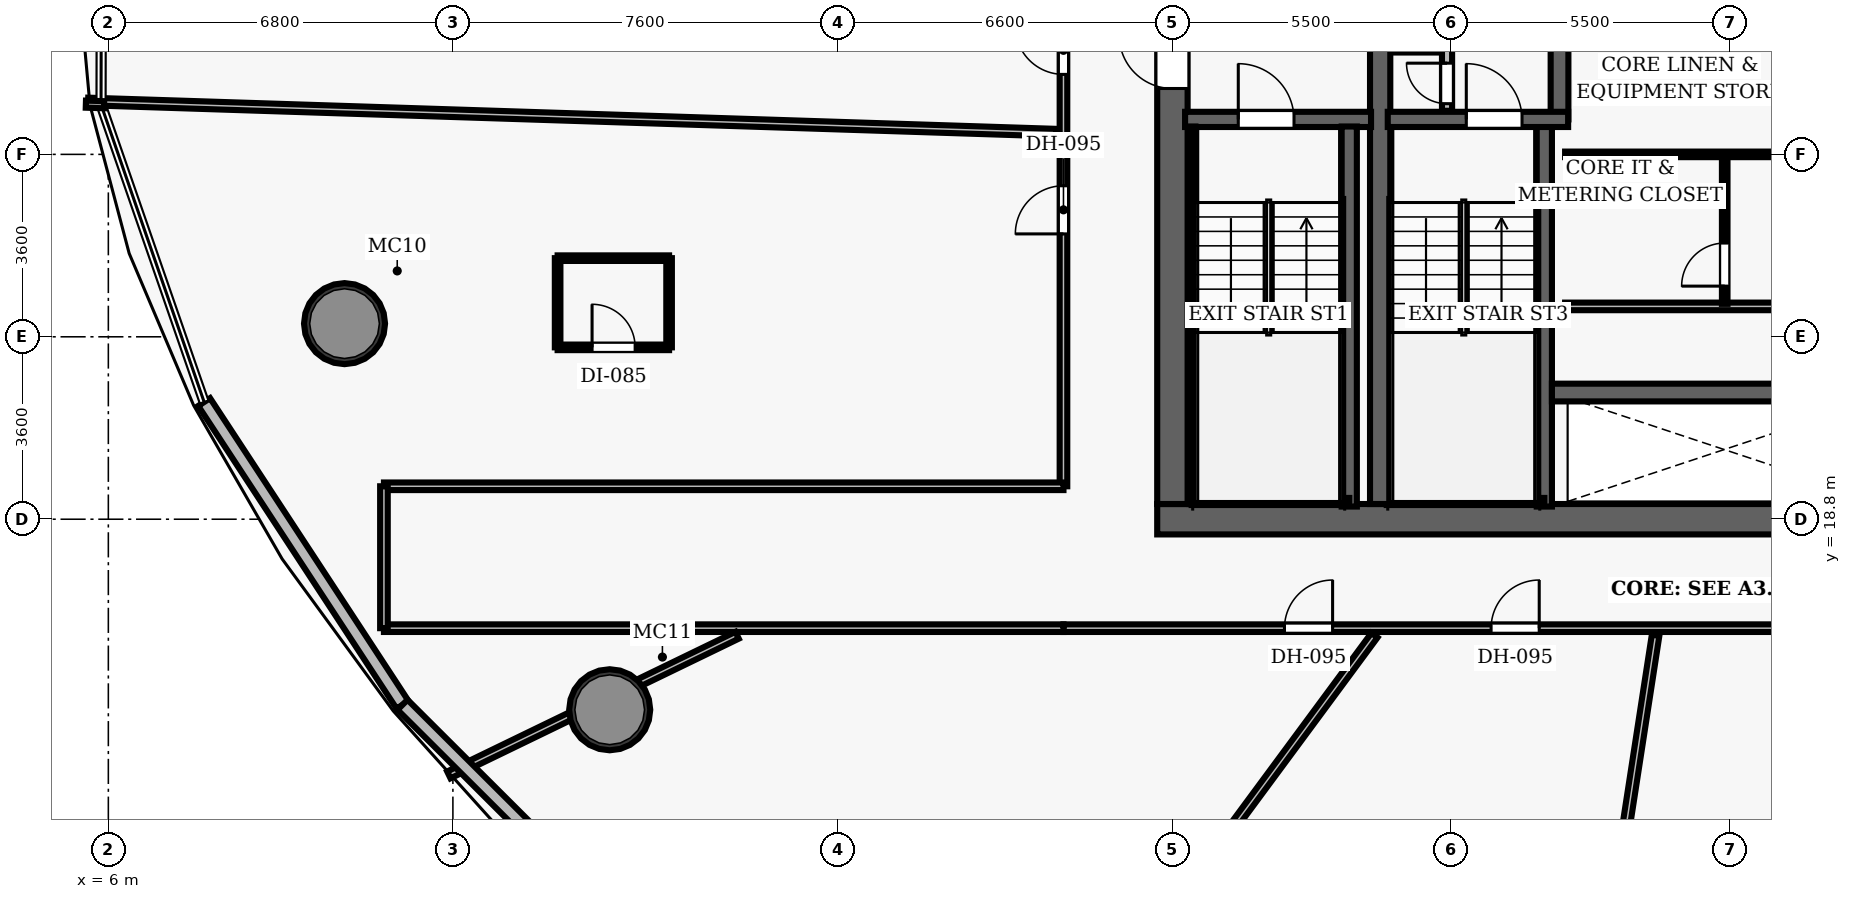
"""IFC4 building model, lengths in metres.
Left out: names, types, materials, properties, quantities, classifications, styles, units other than length and angle.
Written with IfcOpenShell. Run it as: python <this file> out.ifc"""

import sys

from ifc_helpers import new_model, si_unit, direction, frame, frame_2d, origin, origin_2d, place, context, subcontext, project, spatial, rectangle, hollow_circle, extrude, element, fill, save


model = new_model("IFC4")
c1 = context("Model", 3, precision=1e-05, world=origin(), true_north=direction((0.0, 1.0)))
c2 = subcontext(c1, "Body", "Model", "MODEL_VIEW")
j1 = project(units=[si_unit("LENGTHUNIT", "METRE"), si_unit("PLANEANGLEUNIT", "RADIAN")], contexts=[c1])
p1 = place(None, origin())
s1 = spatial("IfcSite", under=j1, at=p1, CompositionType="ELEMENT")
p2 = place(p1, origin())
s2 = spatial("IfcBuilding", under=s1, at=p2, CompositionType="ELEMENT")
p3 = place(p2, frame((0.0, 0.0, 79.9)))
s3 = spatial("IfcBuildingStorey", under=s2, at=p3, CompositionType="ELEMENT", Elevation=79.9)
p4 = place(p3, frame((26.7, 18.8, 0.0), z_axis=(0.0, 0.0, 1.0), x_axis=(1.0, 0.0, 0.0)))
e1 = element("IfcWall", 1, at=p4, inside=s3, PredefinedType="SHEAR", context=c2, shape_type="SweptSolid", body=[
    extrude(rectangle(XDim=22.6, YDim=0.6, at=frame_2d((11.3, 0.0))), origin(), (0.0, 0.0, 1.0), 3.5),
])
p5 = place(p4, frame((14.52, 0.0, 0.0)))
e2 = element("IfcOpeningElement", 2, at=p5, cuts=e1, PredefinedType="OPENING", context=c2, shape_type="SweptSolid", body=[
    extrude(rectangle(XDim=1.05, YDim=2.15, at=frame_2d((0.525, 1.075))), frame((0.0, 0.31, 0.0), z_axis=(0.0, -1.0, 0.0), x_axis=(1.0, 0.0, 0.0)), (0.0, 0.0, 1.0), 0.62),
])
p6 = place(p3, frame((27.0, 19.1, 0.0), z_axis=(0.0, 0.0, 1.0), x_axis=(0.0, 1.0, 0.0)))
e3 = element("IfcWall", 3, at=p6, inside=s3, PredefinedType="SHEAR", context=c2, shape_type="SweptSolid", body=[
    extrude(rectangle(XDim=13.8, YDim=0.6, at=frame_2d((6.9, 0.0))), origin(), (0.0, 0.0, 1.0), 3.5),
])
p7 = place(p6, frame((8.2, 0.0, 0.0)))
e4 = element("IfcOpeningElement", 4, at=p7, cuts=e3, PredefinedType="OPENING", context=c2, shape_type="SweptSolid", body=[
    extrude(rectangle(XDim=1.05, YDim=2.15, at=frame_2d((0.525, 1.075))), frame((0.0, 0.31, 0.0), z_axis=(0.0, -1.0, 0.0), x_axis=(1.0, 0.0, 0.0)), (0.0, 0.0, 1.0), 0.62),
])
p8 = place(p3, frame((31.1, 19.1, 0.0), z_axis=(0.0, 0.0, 1.0), x_axis=(0.0, 1.0, 0.0)))
e5 = element("IfcWall", 5, at=p8, inside=s3, PredefinedType="SHEAR", context=c2, shape_type="SweptSolid", body=[
    extrude(rectangle(XDim=13.8, YDim=0.4, at=frame_2d((6.9, 0.0))), origin(), (0.0, 0.0, 1.0), 3.5),
])
for number, where, z_axis, x_axis in (
    (6, (10.661, 22.66, 0.0), (0.0, 0.0, 1.0), (1.0, 0.0, 0.0)),
    (7, (15.895, 15.04, 0.0), (0.0, 0.0, 1.0), (1.0, 0.0, 0.0)),
):
    element("IfcColumn", number, at=place(p3, frame(where, z_axis=z_axis, x_axis=x_axis)), inside=s3, PredefinedType="COLUMN", context=c2, shape_type="SweptSolid", body=[
        extrude(hollow_circle(Radius=0.8, WallThickness=0.06, at=origin_2d()), origin(), (0.0, 0.0, 1.0), 3.5),
    ])
p9 = place(p3, frame((27.25, 26.69, 0.0), z_axis=(0.0, 0.0, 1.0), x_axis=(1.0, 0.0, 0.0)))
e8 = element("IfcWall", 8, at=p9, inside=s3, PredefinedType="SHEAR", context=c2, shape_type="SweptSolid", body=[
    extrude(rectangle(XDim=3.67, YDim=0.3, at=frame_2d((1.835, 0.0))), origin(), (0.0, 0.0, 1.0), 3.5),
])
p10 = place(p9, frame((1.05, 0.0, 0.0)))
e9 = element("IfcOpeningElement", 9, at=p10, cuts=e8, PredefinedType="OPENING", context=c2, shape_type="SweptSolid", body=[
    extrude(rectangle(XDim=1.1, YDim=2.15, at=frame_2d((0.55, 1.075))), frame((0.0, 0.16, 0.0), z_axis=(0.0, -1.0, 0.0), x_axis=(1.0, 0.0, 0.0)), (0.0, 0.0, 1.0), 0.32),
])
p11 = place(p3, frame((30.49, 19.05, 0.0), z_axis=(0.0, 0.0, 1.0), x_axis=(0.0, 1.0, 0.0)))
e10 = element("IfcWall", 10, at=p11, inside=s3, PredefinedType="SHEAR", context=c2, shape_type="SweptSolid", body=[
    extrude(rectangle(XDim=7.5, YDim=0.3, at=frame_2d((3.75, 0.0))), origin(), (0.0, 0.0, 1.0), 3.5),
])
p12 = place(p3, frame((27.395, 19.1, 0.0), z_axis=(0.0, 0.0, 1.0), x_axis=(0.0, 1.0, 0.0)))
e11 = element("IfcWall", 11, at=p12, inside=s3, PredefinedType="SHEAR", context=c2, shape_type="SweptSolid", body=[
    extrude(rectangle(XDim=7.45, YDim=0.12, at=frame_2d((3.725, 0.0))), origin(), (0.0, 0.0, 1.0), 3.5),
])
p13 = place(p3, frame((27.395, 19.16, 0.0), z_axis=(0.0, 0.0, 1.0), x_axis=(1.0, 0.0, 0.0)))
e12 = element("IfcWall", 12, at=p13, inside=s3, PredefinedType="SHEAR", context=c2, shape_type="SweptSolid", body=[
    extrude(rectangle(XDim=3.095, YDim=0.12, at=frame_2d((1.547, 0.0))), origin(), (0.0, 0.0, 1.0), 3.5),
])
p14 = place(p3, frame((34.34, 19.05, 0.0), z_axis=(0.0, 0.0, 1.0), x_axis=(0.0, 1.0, 0.0)))
e13 = element("IfcWall", 13, at=p14, inside=s3, PredefinedType="SHEAR", context=c2, shape_type="SweptSolid", body=[
    extrude(rectangle(XDim=7.5, YDim=0.3, at=frame_2d((3.75, 0.0))), origin(), (0.0, 0.0, 1.0), 3.5),
])
p15 = place(p3, frame((34.64, 26.69, 0.0), z_axis=(0.0, 0.0, 1.0), x_axis=(0.0, 1.0, 0.0)))
e14 = element("IfcWall", 14, at=p15, inside=s3, PredefinedType="SHEAR", context=c2, shape_type="SweptSolid", body=[
    extrude(rectangle(XDim=6.26, YDim=0.35, at=frame_2d((3.13, 0.0))), origin(), (0.0, 0.0, 1.0), 3.5),
])
p16 = place(p3, frame((31.25, 26.69, 0.0), z_axis=(0.0, 0.0, 1.0), x_axis=(1.0, 0.0, 0.0)))
e15 = element("IfcWall", 15, at=p16, inside=s3, PredefinedType="SHEAR", context=c2, shape_type="SweptSolid", body=[
    extrude(rectangle(XDim=3.56, YDim=0.3, at=frame_2d((1.78, 0.0))), origin(), (0.0, 0.0, 1.0), 3.5),
])
p17 = place(p16, frame((1.55, 0.0, 0.0)))
e16 = element("IfcOpeningElement", 16, at=p17, cuts=e15, PredefinedType="OPENING", context=c2, shape_type="SweptSolid", body=[
    extrude(rectangle(XDim=1.1, YDim=2.15, at=frame_2d((0.55, 1.075))), frame((0.0, 0.16, 0.0), z_axis=(0.0, -1.0, 0.0), x_axis=(1.0, 0.0, 0.0)), (0.0, 0.0, 1.0), 0.32),
])
p18 = place(p3, frame((31.3, 19.16, 0.0), z_axis=(0.0, 0.0, 1.0), x_axis=(1.0, 0.0, 0.0)))
e17 = element("IfcWall", 17, at=p18, inside=s3, PredefinedType="SHEAR", context=c2, shape_type="SweptSolid", body=[
    extrude(rectangle(XDim=3.04, YDim=0.12, at=frame_2d((1.52, 0.0))), origin(), (0.0, 0.0, 1.0), 3.5),
])
p19 = place(p3, frame((32.42, 26.86, 0.0), z_axis=(0.0, 0.0, 1.0), x_axis=(0.0, 1.0, 0.0)))
e18 = element("IfcWall", 18, at=p19, inside=s3, PredefinedType="PARTITIONING", context=c2, shape_type="SweptSolid", body=[
    extrude(rectangle(XDim=2.04, YDim=0.2, at=frame_2d((1.02, 0.0))), origin(), (0.0, 0.0, 1.0), 2.6),
])
p20 = place(p19, frame((0.14, 0.0, 0.0)))
e19 = element("IfcOpeningElement", 19, at=p20, cuts=e18, PredefinedType="OPENING", context=c2, shape_type="SweptSolid", body=[
    extrude(rectangle(XDim=0.8, YDim=2.05, at=frame_2d((0.4, 1.025))), frame((0.0, 0.11, 0.0), z_axis=(0.0, -1.0, 0.0), x_axis=(1.0, 0.0, 0.0)), (0.0, 0.0, 1.0), 0.22),
])
p21 = place(p3, frame((34.49, 21.3, 0.0), z_axis=(0.0, 0.0, 1.0), x_axis=(1.0, 0.0, 0.0)))
e20 = element("IfcWall", 20, at=p21, inside=s3, PredefinedType="SHEAR", context=c2, shape_type="SweptSolid", body=[
    extrude(rectangle(XDim=6.68, YDim=0.35, at=frame_2d((3.34, 0.0))), origin(), (0.0, 0.0, 1.0), 2.6),
])
p22 = place(p3, frame((34.75, 23.0, 0.0), z_axis=(0.0, 0.0, 1.0), x_axis=(1.0, 0.0, 0.0)))
e21 = element("IfcWall", 21, at=p22, inside=s3, PredefinedType="PARTITIONING", context=c2, shape_type="SweptSolid", body=[
    extrude(rectangle(XDim=6.25, YDim=0.15, at=frame_2d((3.125, 0.0))), origin(), (0.0, 0.0, 1.0), 2.6),
])
p23 = place(p3, frame((34.75, 26.0, 0.0), z_axis=(0.0, 0.0, 1.0), x_axis=(1.0, 0.0, 0.0)))
e22 = element("IfcWall", 22, at=p23, inside=s3, PredefinedType="PARTITIONING", context=c2, shape_type="SweptSolid", body=[
    extrude(rectangle(XDim=6.25, YDim=0.11, at=frame_2d((3.125, 0.0))), origin(), (0.0, 0.0, 1.0), 2.6),
])
p24 = place(p3, frame((37.9, 23.05, 0.0), z_axis=(0.0, 0.0, 1.0), x_axis=(0.0, 1.0, 0.0)))
e23 = element("IfcWall", 23, at=p24, inside=s3, PredefinedType="PARTITIONING", context=c2, shape_type="SweptSolid", body=[
    extrude(rectangle(XDim=2.95, YDim=0.11, at=frame_2d((1.475, 0.0))), origin(), (0.0, 0.0, 1.0), 2.6),
])
p25 = place(p24, frame((0.35, 0.0, 0.0)))
e24 = element("IfcOpeningElement", 24, at=p25, cuts=e23, PredefinedType="OPENING", context=c2, shape_type="SweptSolid", body=[
    extrude(rectangle(XDim=0.85, YDim=2.1, at=frame_2d((0.425, 1.05))), frame((0.0, 0.065, 0.0), z_axis=(0.0, -1.0, 0.0), x_axis=(1.0, 0.0, 0.0)), (0.0, 0.0, 1.0), 0.13),
])
p26 = place(p3, frame((24.85, 16.65, 0.0), z_axis=(0.0, 0.0, 1.0), x_axis=(1.0, 0.0, 0.0)))
e25 = element("IfcWall", 25, at=p26, inside=s3, PredefinedType="PARTITIONING", context=c2, shape_type="SweptSolid", body=[
    extrude(rectangle(XDim=23.5, YDim=0.15, at=frame_2d((11.75, 0.0))), origin(), (0.0, 0.0, 1.0), 2.6),
])
p27 = place(p26, frame((4.362, 0.0, 0.0)))
e26 = element("IfcOpeningElement", 26, at=p27, cuts=e25, PredefinedType="OPENING", context=c2, shape_type="SweptSolid", body=[
    extrude(rectangle(XDim=0.95, YDim=2.15, at=frame_2d((0.475, 1.075))), frame((0.0, 0.085, 0.0), z_axis=(0.0, -1.0, 0.0), x_axis=(1.0, 0.0, 0.0)), (0.0, 0.0, 1.0), 0.17),
])
p28 = place(p26, frame((8.439, 0.0, 0.0)))
e27 = element("IfcOpeningElement", 27, at=p28, cuts=e25, PredefinedType="OPENING", context=c2, shape_type="SweptSolid", body=[
    extrude(rectangle(XDim=0.95, YDim=2.15, at=frame_2d((0.475, 1.075))), frame((0.0, 0.085, 0.0), z_axis=(0.0, -1.0, 0.0), x_axis=(1.0, 0.0, 0.0)), (0.0, 0.0, 1.0), 0.17),
])
p29 = place(p26, frame((14.893, 0.0, 0.0)))
e28 = element("IfcOpeningElement", 28, at=p29, cuts=e25, PredefinedType="OPENING", context=c2, shape_type="SweptSolid", body=[
    extrude(rectangle(XDim=0.95, YDim=2.15, at=frame_2d((0.475, 1.075))), frame((0.0, 0.085, 0.0), z_axis=(0.0, -1.0, 0.0), x_axis=(1.0, 0.0, 0.0)), (0.0, 0.0, 1.0), 0.17),
])
p30 = place(p26, frame((17.475, 0.0, 0.0)))
e29 = element("IfcOpeningElement", 29, at=p30, cuts=e25, PredefinedType="OPENING", context=c2, shape_type="SweptSolid", body=[
    extrude(rectangle(XDim=0.95, YDim=2.15, at=frame_2d((0.475, 1.075))), frame((0.0, 0.085, 0.0), z_axis=(0.0, -1.0, 0.0), x_axis=(1.0, 0.0, 0.0)), (0.0, 0.0, 1.0), 0.17),
])
p31 = place(p3, frame((24.85, 19.45, 0.0), z_axis=(0.0, 0.0, 1.0), x_axis=(0.0, 1.0, 0.0)))
e30 = element("IfcWall", 30, at=p31, inside=s3, PredefinedType="PARTITIONING", context=c2, shape_type="SweptSolid", body=[
    extrude(rectangle(XDim=15.9, YDim=0.15, at=frame_2d((7.95, 0.0))), origin(), (0.0, 0.0, 1.0), 2.6),
])
p32 = place(p31, frame((8.128, 0.0, 0.0)))
e31 = element("IfcOpeningElement", 31, at=p32, cuts=e30, PredefinedType="OPENING", context=c2, shape_type="SweptSolid", body=[
    extrude(rectangle(XDim=0.95, YDim=2.15, at=frame_2d((0.475, 1.075))), frame((0.0, 0.085, 0.0), z_axis=(0.0, -1.0, 0.0), x_axis=(1.0, 0.0, 0.0)), (0.0, 0.0, 1.0), 0.17),
])
p33 = place(p31, frame((4.98, 0.0, 0.0)))
e32 = element("IfcOpeningElement", 32, at=p33, cuts=e30, PredefinedType="OPENING", context=c2, shape_type="SweptSolid", body=[
    extrude(rectangle(XDim=0.95, YDim=2.15, at=frame_2d((0.475, 1.075))), frame((0.0, 0.085, 0.0), z_axis=(0.0, -1.0, 0.0), x_axis=(1.0, 0.0, 0.0)), (0.0, 0.0, 1.0), 0.17),
])
for number, where, z_axis, x_axis in (
    (33, (11.439, 19.45, 0.0), (0.0, 0.0, 1.0), (1.0, 0.0, 0.0)),
    (34, (11.439, 16.65, 0.0), (0.0, 0.0, 1.0), (1.0, 0.0, 0.0)),
):
    element("IfcWall", number, at=place(p3, frame(where, z_axis=z_axis, x_axis=x_axis)), inside=s3, PredefinedType="PARTITIONING", context=c2, shape_type="SweptSolid", body=[
        extrude(rectangle(XDim=13.411, YDim=0.15, at=frame_2d((6.706, 0.0))), origin(), (0.0, 0.0, 1.0), 2.6),
    ])
p34 = place(p3, frame((11.439, 16.65, 0.0), z_axis=(0.0, 0.0, 1.0), x_axis=(0.0, 1.0, 0.0)))
e35 = element("IfcWall", 35, at=p34, inside=s3, PredefinedType="PARTITIONING", context=c2, shape_type="SweptSolid", body=[
    extrude(rectangle(XDim=2.8, YDim=0.15, at=frame_2d((1.4, 0.0))), origin(), (0.0, 0.0, 1.0), 2.6),
])
p35 = place(p3, frame((24.71, 26.428, 0.0), z_axis=(0.0, 0.0, 1.0), x_axis=(-0.99948130829, 0.032204260266, 0.0)))
e36 = element("IfcWall", 36, at=p35, inside=s3, PredefinedType="PARTITIONING", context=c2, shape_type="SweptSolid", body=[
    extrude(rectangle(XDim=19.119, YDim=0.15, at=frame_2d((9.56, 0.0))), origin(), (0.0, 0.0, 1.0), 2.6),
])
p36 = place(p3, frame((18.409, 16.51, 0.0), z_axis=(0.0, 0.0, 1.0), x_axis=(-0.899956937803, -0.435978795471, 0.0)))
e37 = element("IfcWall", 37, at=p36, inside=s3, PredefinedType="PARTITIONING", context=c2, shape_type="SweptSolid", body=[
    extrude(rectangle(XDim=6.322, YDim=0.15, at=frame_2d((3.161, 0.0))), origin(), (0.0, 0.0, 1.0), 2.6),
])
p37 = place(p3, frame((30.988, 16.51, 0.0), z_axis=(0.0, 0.0, 1.0), x_axis=(-0.594283048569, -0.804255965587, 0.0)))
e38 = element("IfcWall", 38, at=p37, inside=s3, PredefinedType="PARTITIONING", context=c2, shape_type="SweptSolid", body=[
    extrude(rectangle(XDim=13.538, YDim=0.15, at=frame_2d((6.769, 0.0))), origin(), (0.0, 0.0, 1.0), 2.6),
])
p38 = place(p3, frame((36.536, 16.51, 0.0), z_axis=(0.0, 0.0, 1.0), x_axis=(-0.152461170768, -0.988309461357, 0.0)))
e39 = element("IfcWall", 39, at=p38, inside=s3, PredefinedType="PARTITIONING", context=c2, shape_type="SweptSolid", body=[
    extrude(rectangle(XDim=14.713, YDim=0.15, at=frame_2d((7.356, 0.0))), origin(), (0.0, 0.0, 1.0), 2.6),
])
p39 = place(p3, frame((14.867, 22.192, 0.0), z_axis=(0.0, 0.0, 1.0), x_axis=(1.0, 0.0, 0.0)))
e40 = element("IfcWall", 40, at=p39, inside=s3, PredefinedType="PARTITIONING", context=c2, shape_type="SweptSolid", body=[
    extrude(rectangle(XDim=2.2, YDim=0.11, at=frame_2d((1.1, 0.0))), origin(), (0.0, 0.0, 1.0), 2.6),
])
p40 = place(p39, frame((0.68, 0.0, 0.0)))
e41 = element("IfcOpeningElement", 41, at=p40, cuts=e40, PredefinedType="OPENING", context=c2, shape_type="SweptSolid", body=[
    extrude(rectangle(XDim=0.85, YDim=2.1, at=frame_2d((0.425, 1.05))), frame((0.0, 0.065, 0.0), z_axis=(0.0, -1.0, 0.0), x_axis=(1.0, 0.0, 0.0)), (0.0, 0.0, 1.0), 0.13),
])
p41 = place(p3, frame((14.867, 23.952, 0.0), z_axis=(0.0, 0.0, 1.0), x_axis=(1.0, 0.0, 0.0)))
e42 = element("IfcWall", 42, at=p41, inside=s3, PredefinedType="PARTITIONING", context=c2, shape_type="SweptSolid", body=[
    extrude(rectangle(XDim=2.2, YDim=0.11, at=frame_2d((1.1, 0.0))), origin(), (0.0, 0.0, 1.0), 2.6),
])
for number, where, z_axis, x_axis in (
    (43, (14.867, 22.192, 0.0), (0.0, 0.0, 1.0), (0.0, 1.0, 0.0)),
    (44, (17.067, 22.192, 0.0), (0.0, 0.0, 1.0), (0.0, 1.0, 0.0)),
):
    element("IfcWall", number, at=place(p3, frame(where, z_axis=z_axis, x_axis=x_axis)), inside=s3, PredefinedType="PARTITIONING", context=c2, shape_type="SweptSolid", body=[
        extrude(rectangle(XDim=1.76, YDim=0.11, at=frame_2d((0.88, 0.0))), origin(), (0.0, 0.0, 1.0), 2.6),
    ])
p42 = place(p3, frame((11.806, 15.138, 0.0), z_axis=(0.0, 0.0, 1.0), x_axis=(-0.548104595081, 0.83640979959, 0.0)))
e45 = element("IfcWall", 45, at=p42, inside=s3, PredefinedType="SOLIDWALL", context=c2, shape_type="SweptSolid", body=[
    extrude(rectangle(XDim=7.143, YDim=0.28, at=frame_2d((3.571, 0.0))), origin(), (0.0, 0.0, 1.0), 3.25),
])
p43 = place(p3, frame((17.361, 9.599, 0.0), z_axis=(0.0, 0.0, 1.0), x_axis=(-0.708133036794, 0.706079033962, 0.0)))
e46 = element("IfcWall", 46, at=p43, inside=s3, PredefinedType="SOLIDWALL", context=c2, shape_type="SweptSolid", body=[
    extrude(rectangle(XDim=7.845, YDim=0.28, at=frame_2d((3.922, 0.0))), origin(), (0.0, 0.0, 1.0), 3.25),
])
p44 = place(p10, origin())
e47 = element("IfcDoor", 47, at=p44, inside=s3, OperationType="SINGLE_SWING_LEFT", PredefinedType="DOOR", context=c2, shape_type="SweptSolid", body=[
    extrude(rectangle(XDim=1.1, YDim=2.15, at=frame_2d((0.55, 1.075))), frame((0.0, 0.025, 0.0), z_axis=(0.0, -1.0, 0.0), x_axis=(1.0, 0.0, 0.0)), (0.0, 0.0, 1.0), 0.05),
])
fill(e9, e47)
p45 = place(p7, origin())
e48 = element("IfcDoor", 48, at=p45, inside=s3, OperationType="SINGLE_SWING_RIGHT", PredefinedType="DOOR", context=c2, shape_type="SweptSolid", body=[
    extrude(rectangle(XDim=1.05, YDim=2.15, at=frame_2d((0.525, 1.075))), frame((0.0, 0.025, 0.0), z_axis=(0.0, -1.0, 0.0), x_axis=(1.0, 0.0, 0.0)), (0.0, 0.0, 1.0), 0.05),
])
fill(e4, e48)
p46 = place(p17, origin())
e49 = element("IfcDoor", 49, at=p46, inside=s3, OperationType="SINGLE_SWING_LEFT", PredefinedType="DOOR", context=c2, shape_type="SweptSolid", body=[
    extrude(rectangle(XDim=1.1, YDim=2.15, at=frame_2d((0.55, 1.075))), frame((0.0, 0.025, 0.0), z_axis=(0.0, -1.0, 0.0), x_axis=(1.0, 0.0, 0.0)), (0.0, 0.0, 1.0), 0.05),
])
fill(e16, e49)
p47 = place(p20, origin())
e50 = element("IfcDoor", 50, at=p47, inside=s3, OperationType="SINGLE_SWING_RIGHT", PredefinedType="DOOR", context=c2, shape_type="SweptSolid", body=[
    extrude(rectangle(XDim=0.8, YDim=2.05, at=frame_2d((0.4, 1.025))), frame((0.0, 0.025, 0.0), z_axis=(0.0, -1.0, 0.0), x_axis=(1.0, 0.0, 0.0)), (0.0, 0.0, 1.0), 0.05),
])
fill(e19, e50)
p48 = place(p25, origin())
e51 = element("IfcDoor", 51, at=p48, inside=s3, OperationType="SINGLE_SWING_LEFT", PredefinedType="DOOR", context=c2, shape_type="SweptSolid", body=[
    extrude(rectangle(XDim=0.85, YDim=2.1, at=frame_2d((0.425, 1.05))), frame((0.0, 0.025, 0.0), z_axis=(0.0, -1.0, 0.0), x_axis=(1.0, 0.0, 0.0)), (0.0, 0.0, 1.0), 0.05),
])
fill(e24, e51)
p49 = place(p32, origin())
e52 = element("IfcDoor", 52, at=p49, inside=s3, OperationType="SINGLE_SWING_RIGHT", PredefinedType="DOOR", context=c2, shape_type="SweptSolid", body=[
    extrude(rectangle(XDim=0.95, YDim=2.15, at=frame_2d((0.475, 1.075))), frame((0.0, 0.025, 0.0), z_axis=(0.0, -1.0, 0.0), x_axis=(1.0, 0.0, 0.0)), (0.0, 0.0, 1.0), 0.05),
])
fill(e31, e52)
p50 = place(p33, origin())
e53 = element("IfcDoor", 53, at=p50, inside=s3, OperationType="SINGLE_SWING_LEFT", PredefinedType="DOOR", context=c2, shape_type="SweptSolid", body=[
    extrude(rectangle(XDim=0.95, YDim=2.15, at=frame_2d((0.475, 1.075))), frame((0.0, 0.025, 0.0), z_axis=(0.0, -1.0, 0.0), x_axis=(1.0, 0.0, 0.0)), (0.0, 0.0, 1.0), 0.05),
])
fill(e32, e53)
p51 = place(p40, origin())
e54 = element("IfcDoor", 54, at=p51, inside=s3, OperationType="SINGLE_SWING_LEFT", PredefinedType="DOOR", context=c2, shape_type="SweptSolid", body=[
    extrude(rectangle(XDim=0.85, YDim=2.1, at=frame_2d((0.425, 1.05))), frame((0.0, 0.025, 0.0), z_axis=(0.0, -1.0, 0.0), x_axis=(1.0, 0.0, 0.0)), (0.0, 0.0, 1.0), 0.05),
])
fill(e41, e54)
p52 = place(p27, origin())
e55 = element("IfcDoor", 55, at=p52, inside=s3, OperationType="SINGLE_SWING_RIGHT", PredefinedType="DOOR", context=c2, shape_type="SweptSolid", body=[
    extrude(rectangle(XDim=0.95, YDim=2.15, at=frame_2d((0.475, 1.075))), frame((0.0, 0.025, 0.0), z_axis=(0.0, -1.0, 0.0), x_axis=(1.0, 0.0, 0.0)), (0.0, 0.0, 1.0), 0.05),
])
fill(e26, e55)
p53 = place(p28, origin())
e56 = element("IfcDoor", 56, at=p53, inside=s3, OperationType="SINGLE_SWING_RIGHT", PredefinedType="DOOR", context=c2, shape_type="SweptSolid", body=[
    extrude(rectangle(XDim=0.95, YDim=2.15, at=frame_2d((0.475, 1.075))), frame((0.0, 0.025, 0.0), z_axis=(0.0, -1.0, 0.0), x_axis=(1.0, 0.0, 0.0)), (0.0, 0.0, 1.0), 0.05),
])
fill(e27, e56)
save(model, sys.argv[1])
